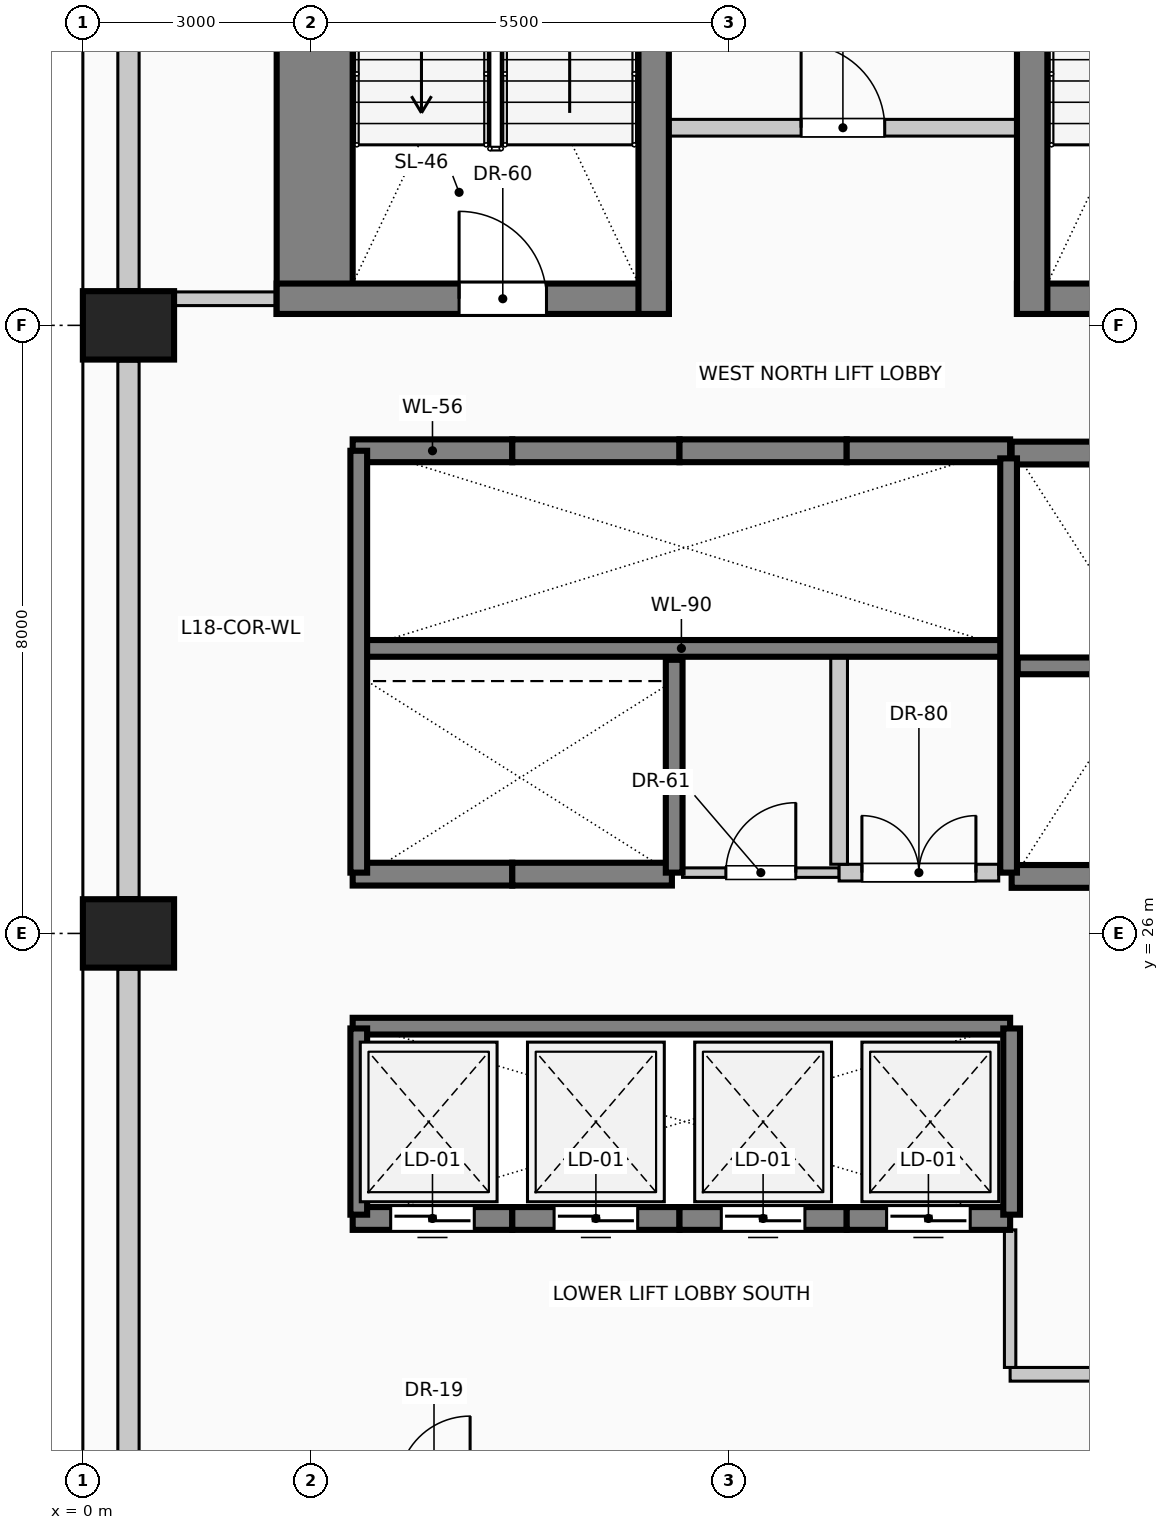
"""IFC4 building model, lengths in metres.
Left out: names, types, materials, properties, quantities, classifications, styles, units other than length and angle.
Written with IfcOpenShell. Run it as: python <this file> out.ifc"""

import sys

from ifc_helpers import new_model, si_unit, direction, frame, frame_2d, origin, origin_2d, place, context, subcontext, project, spatial, rectangle, extrude, element, fill, save


model = new_model("IFC4")
c1 = context("Model", 3, precision=1e-05, world=origin(), true_north=direction((0.0, 1.0)))
c2 = subcontext(c1, "Body", "Model", "MODEL_VIEW")
j1 = project(units=[si_unit("LENGTHUNIT", "METRE"), si_unit("PLANEANGLEUNIT", "RADIAN")], contexts=[c1])
p1 = place(None, origin())
s1 = spatial("IfcSite", under=j1, at=p1, CompositionType="ELEMENT")
p2 = place(p1, origin())
s2 = spatial("IfcBuilding", under=s1, at=p2, CompositionType="ELEMENT")
p3 = place(p2, frame((0.0, 0.0, 74.6)))
s3 = spatial("IfcBuildingStorey", under=s2, at=p3, CompositionType="ELEMENT", Elevation=74.6)
p4 = place(p3, frame((3.05, 34.15, 0.0), z_axis=(0.0, 0.0, 1.0), x_axis=(0.0, 1.0, 0.0)))
e1 = element("IfcWall", 1, at=p4, inside=s3, PredefinedType="SHEAR", context=c2, shape_type="SweptSolid", body=[
    extrude(rectangle(XDim=9.28, YDim=1.0, at=frame_2d((4.64, 0.0))), origin(), (0.0, 0.0, 1.0), 4.0),
])
p5 = place(p3, frame((2.55, 34.35, 0.0), z_axis=(0.0, 0.0, 1.0), x_axis=(1.0, 0.0, 0.0)))
e2 = element("IfcWall", 2, at=p5, inside=s3, PredefinedType="SHEAR", context=c2, shape_type="SweptSolid", body=[
    extrude(rectangle(XDim=5.16, YDim=0.4, at=frame_2d((2.58, 0.0))), origin(), (0.0, 0.0, 1.0), 4.0),
])
p6 = place(p5, frame((2.4, 0.0, 0.0)))
e3 = element("IfcOpeningElement", 3, at=p6, cuts=e2, PredefinedType="OPENING", context=c2, shape_type="SweptSolid", body=[
    extrude(rectangle(XDim=1.15, YDim=2.2, at=frame_2d((0.575, 1.1))), frame((0.0, 0.21, 0.0), z_axis=(0.0, -1.0, 0.0), x_axis=(1.0, 0.0, 0.0)), (0.0, 0.0, 1.0), 0.42),
])
p7 = place(p3, frame((12.29, 34.35, 0.0), z_axis=(0.0, 0.0, 1.0), x_axis=(1.0, 0.0, 0.0)))
e4 = element("IfcWall", 4, at=p7, inside=s3, PredefinedType="SHEAR", context=c2, shape_type="SweptSolid", body=[
    extrude(rectangle(XDim=5.16, YDim=0.4, at=frame_2d((2.58, 0.0))), origin(), (0.0, 0.0, 1.0), 4.0),
])
p8 = place(p7, frame((1.4, 0.0, 0.0)))
e5 = element("IfcOpeningElement", 5, at=p8, cuts=e4, PredefinedType="OPENING", context=c2, shape_type="SweptSolid", body=[
    extrude(rectangle(XDim=1.15, YDim=2.2, at=frame_2d((0.575, 1.1))), frame((0.0, 0.21, 0.0), z_axis=(0.0, -1.0, 0.0), x_axis=(1.0, 0.0, 0.0)), (0.0, 0.0, 1.0), 0.42),
])
for number, where, z_axis, x_axis in (
    (6, (7.51, 34.15, 0.0), (0.0, 0.0, 1.0), (0.0, 1.0, 0.0)),
    (7, (12.49, 34.15, 0.0), (0.0, 0.0, 1.0), (0.0, 1.0, 0.0)),
):
    element("IfcWall", number, at=place(p3, frame(where, z_axis=z_axis, x_axis=x_axis)), inside=s3, PredefinedType="SHEAR", context=c2, shape_type="SweptSolid", body=[
        extrude(rectangle(XDim=9.28, YDim=0.4, at=frame_2d((4.64, 0.0))), origin(), (0.0, 0.0, 1.0), 4.0),
    ])
for number, where, z_axis, x_axis in (
    (8, (0.6, 26.0, 0.0), (0.0, 0.0, 1.0), (0.0, 1.0, 0.0)),
    (9, (0.6, 34.0, 0.0), (0.0, 0.0, 1.0), (0.0, 1.0, 0.0)),
):
    element("IfcColumn", number, at=place(p3, frame(where, z_axis=z_axis, x_axis=x_axis)), inside=s3, PredefinedType="COLUMN", context=c2, shape_type="SweptSolid", body=[
        extrude(rectangle(XDim=0.9, YDim=1.2, at=origin_2d()), origin(), (0.0, 0.0, 1.0), 4.0),
    ])
for number, where, z_axis, x_axis in (
    (10, (0.6, 18.47, 0.0), (0.0, 0.0, 1.0), (0.0, 1.0, 0.0)),
    (11, (0.6, 26.47, 0.0), (0.0, 0.0, 1.0), (0.0, 1.0, 0.0)),
):
    element("IfcWall", number, at=place(p3, frame(where, z_axis=z_axis, x_axis=x_axis)), inside=s3, PredefinedType="SOLIDWALL", context=c2, shape_type="SweptSolid", body=[
        extrude(rectangle(XDim=7.06, YDim=0.28, at=frame_2d((3.53, 0.0))), origin(), (0.0, 0.0, 1.0), 2.85),
    ])
p9 = place(p3, frame((0.6, 34.47, 0.0), z_axis=(0.0, 0.0, 1.0), x_axis=(0.0, 1.0, 0.0)))
e12 = element("IfcWall", 12, at=p9, inside=s3, PredefinedType="SOLIDWALL", context=c2, shape_type="SweptSolid", body=[
    extrude(rectangle(XDim=7.46, YDim=0.28, at=frame_2d((3.73, 0.0))), origin(), (0.0, 0.0, 1.0), 2.85),
])
p10 = place(p3, frame((5.65, 22.25, 0.0), z_axis=(0.0, 0.0, 1.0), x_axis=(-1.0, 0.0, 0.0)))
e13 = element("IfcWall", 13, at=p10, inside=s3, PredefinedType="SOLIDWALL", context=c2, shape_type="SweptSolid", body=[
    extrude(rectangle(XDim=2.1, YDim=0.3, at=frame_2d((1.05, 0.0))), origin(), (0.0, 0.0, 1.0), 4.0),
])
p11 = place(p10, frame((0.5, 0.0, 0.0)))
e14 = element("IfcOpeningElement", 14, at=p11, cuts=e13, PredefinedType="OPENING", context=c2, shape_type="SweptSolid", body=[
    extrude(rectangle(XDim=1.1, YDim=2.2, at=frame_2d((0.55, 1.1))), frame((0.0, 0.16, 0.0), z_axis=(0.0, -1.0, 0.0), x_axis=(1.0, 0.0, 0.0)), (0.0, 0.0, 1.0), 0.32),
])
p12 = place(p3, frame((7.85, 22.25, 0.0), z_axis=(0.0, 0.0, 1.0), x_axis=(-1.0, 0.0, 0.0)))
e15 = element("IfcWall", 15, at=p12, inside=s3, PredefinedType="SOLIDWALL", context=c2, shape_type="SweptSolid", body=[
    extrude(rectangle(XDim=2.2, YDim=0.3, at=frame_2d((1.1, 0.0))), origin(), (0.0, 0.0, 1.0), 4.0),
])
p13 = place(p12, frame((0.55, 0.0, 0.0)))
e16 = element("IfcOpeningElement", 16, at=p13, cuts=e15, PredefinedType="OPENING", context=c2, shape_type="SweptSolid", body=[
    extrude(rectangle(XDim=1.1, YDim=2.2, at=frame_2d((0.55, 1.1))), frame((0.0, 0.16, 0.0), z_axis=(0.0, -1.0, 0.0), x_axis=(1.0, 0.0, 0.0)), (0.0, 0.0, 1.0), 0.32),
])
p14 = place(p3, frame((10.05, 22.25, 0.0), z_axis=(0.0, 0.0, 1.0), x_axis=(-1.0, 0.0, 0.0)))
e17 = element("IfcWall", 17, at=p14, inside=s3, PredefinedType="SOLIDWALL", context=c2, shape_type="SweptSolid", body=[
    extrude(rectangle(XDim=2.2, YDim=0.3, at=frame_2d((1.1, 0.0))), origin(), (0.0, 0.0, 1.0), 4.0),
])
p15 = place(p14, frame((0.55, 0.0, 0.0)))
e18 = element("IfcOpeningElement", 18, at=p15, cuts=e17, PredefinedType="OPENING", context=c2, shape_type="SweptSolid", body=[
    extrude(rectangle(XDim=1.1, YDim=2.2, at=frame_2d((0.55, 1.1))), frame((0.0, 0.16, 0.0), z_axis=(0.0, -1.0, 0.0), x_axis=(1.0, 0.0, 0.0)), (0.0, 0.0, 1.0), 0.32),
])
p16 = place(p3, frame((12.2, 22.25, 0.0), z_axis=(0.0, 0.0, 1.0), x_axis=(-1.0, 0.0, 0.0)))
e19 = element("IfcWall", 19, at=p16, inside=s3, PredefinedType="SOLIDWALL", context=c2, shape_type="SweptSolid", body=[
    extrude(rectangle(XDim=2.15, YDim=0.3, at=frame_2d((1.075, 0.0))), origin(), (0.0, 0.0, 1.0), 4.0),
])
p17 = place(p16, frame((0.525, 0.0, 0.0)))
e20 = element("IfcOpeningElement", 20, at=p17, cuts=e19, PredefinedType="OPENING", context=c2, shape_type="SweptSolid", body=[
    extrude(rectangle(XDim=1.1, YDim=2.2, at=frame_2d((0.55, 1.1))), frame((0.0, 0.16, 0.0), z_axis=(0.0, -1.0, 0.0), x_axis=(1.0, 0.0, 0.0)), (0.0, 0.0, 1.0), 0.32),
])
for number, where, z_axis, x_axis in (
    (21, (14.0, 26.75, 0.0), (0.0, 0.0, 1.0), (-1.0, 0.0, 0.0)),
    (22, (12.22, 32.32, 0.0), (0.0, 0.0, 1.0), (1.0, 0.0, 0.0)),
):
    element("IfcWall", number, at=place(p3, frame(where, z_axis=z_axis, x_axis=x_axis)), inside=s3, PredefinedType="SOLIDWALL", context=c2, shape_type="SweptSolid", body=[
        extrude(rectangle(XDim=1.78, YDim=0.3, at=frame_2d((0.89, 0.0))), origin(), (0.0, 0.0, 1.0), 4.0),
    ])
p18 = place(p3, frame((3.55, 32.35, 0.0), z_axis=(0.0, 0.0, 1.0), x_axis=(1.0, 0.0, 0.0)))
e23 = element("IfcWall", 23, at=p18, inside=s3, PredefinedType="SOLIDWALL", context=c2, shape_type="SweptSolid", body=[
    extrude(rectangle(XDim=2.1, YDim=0.3, at=frame_2d((1.05, 0.0))), origin(), (0.0, 0.0, 1.0), 4.0),
])
p19 = place(p3, frame((5.65, 32.35, 0.0), z_axis=(0.0, 0.0, 1.0), x_axis=(1.0, 0.0, 0.0)))
e24 = element("IfcWall", 24, at=p19, inside=s3, PredefinedType="SOLIDWALL", context=c2, shape_type="SweptSolid", body=[
    extrude(rectangle(XDim=2.2, YDim=0.3, at=frame_2d((1.1, 0.0))), origin(), (0.0, 0.0, 1.0), 4.0),
])
p20 = place(p3, frame((7.85, 32.35, 0.0), z_axis=(0.0, 0.0, 1.0), x_axis=(1.0, 0.0, 0.0)))
e25 = element("IfcWall", 25, at=p20, inside=s3, PredefinedType="SOLIDWALL", context=c2, shape_type="SweptSolid", body=[
    extrude(rectangle(XDim=2.2, YDim=0.3, at=frame_2d((1.1, 0.0))), origin(), (0.0, 0.0, 1.0), 4.0),
])
p21 = place(p3, frame((10.05, 32.35, 0.0), z_axis=(0.0, 0.0, 1.0), x_axis=(1.0, 0.0, 0.0)))
e26 = element("IfcWall", 26, at=p21, inside=s3, PredefinedType="SOLIDWALL", context=c2, shape_type="SweptSolid", body=[
    extrude(rectangle(XDim=2.15, YDim=0.3, at=frame_2d((1.075, 0.0))), origin(), (0.0, 0.0, 1.0), 4.0),
])
p22 = place(p3, frame((5.65, 26.78, 0.0), z_axis=(0.0, 0.0, 1.0), x_axis=(-1.0, 0.0, 0.0)))
e27 = element("IfcWall", 27, at=p22, inside=s3, PredefinedType="SOLIDWALL", context=c2, shape_type="SweptSolid", body=[
    extrude(rectangle(XDim=2.1, YDim=0.3, at=frame_2d((1.05, 0.0))), origin(), (0.0, 0.0, 1.0), 4.0),
])
p23 = place(p3, frame((7.75, 26.78, 0.0), z_axis=(0.0, 0.0, 1.0), x_axis=(-1.0, 0.0, 0.0)))
e28 = element("IfcWall", 28, at=p23, inside=s3, PredefinedType="SOLIDWALL", context=c2, shape_type="SweptSolid", body=[
    extrude(rectangle(XDim=2.1, YDim=0.3, at=frame_2d((1.05, 0.0))), origin(), (0.0, 0.0, 1.0), 4.0),
])
p24 = place(p3, frame((3.55, 29.75, 0.0), z_axis=(0.0, 0.0, 1.0), x_axis=(1.0, 0.0, 0.0)))
e29 = element("IfcWall", 29, at=p24, inside=s3, PredefinedType="SOLIDWALL", context=c2, shape_type="SweptSolid", body=[
    extrude(rectangle(XDim=8.65, YDim=0.22, at=frame_2d((4.325, 0.0))), origin(), (0.0, 0.0, 1.0), 4.0),
])
p25 = place(p3, frame((3.63, 26.8, 0.0), z_axis=(0.0, 0.0, 1.0), x_axis=(0.0, 1.0, 0.0)))
e30 = element("IfcWall", 30, at=p25, inside=s3, PredefinedType="SOLIDWALL", context=c2, shape_type="SweptSolid", body=[
    extrude(rectangle(XDim=5.55, YDim=0.22, at=frame_2d((2.775, 0.0))), origin(), (0.0, 0.0, 1.0), 4.0),
])
p26 = place(p3, frame((7.78, 26.8, 0.0), z_axis=(0.0, 0.0, 1.0), x_axis=(0.0, 1.0, 0.0)))
e31 = element("IfcWall", 31, at=p26, inside=s3, PredefinedType="SOLIDWALL", context=c2, shape_type="SweptSolid", body=[
    extrude(rectangle(XDim=2.8, YDim=0.22, at=frame_2d((1.4, 0.0))), origin(), (0.0, 0.0, 1.0), 4.0),
])
p27 = place(p3, frame((12.18, 26.8, 0.0), z_axis=(0.0, 0.0, 1.0), x_axis=(0.0, 1.0, 0.0)))
e32 = element("IfcWall", 32, at=p27, inside=s3, PredefinedType="SOLIDWALL", context=c2, shape_type="SweptSolid", body=[
    extrude(rectangle(XDim=5.45, YDim=0.22, at=frame_2d((2.725, 0.0))), origin(), (0.0, 0.0, 1.0), 4.0),
])
p28 = place(p3, frame((12.3, 29.52, 0.0), z_axis=(0.0, 0.0, 1.0), x_axis=(1.0, 0.0, 0.0)))
e33 = element("IfcWall", 33, at=p28, inside=s3, PredefinedType="SOLIDWALL", context=c2, shape_type="SweptSolid", body=[
    extrude(rectangle(XDim=3.4, YDim=0.22, at=frame_2d((1.7, 0.0))), origin(), (0.0, 0.0, 1.0), 4.0),
])
p29 = place(p3, frame((3.55, 24.78, 0.0), z_axis=(0.0, 0.0, 1.0), x_axis=(1.0, 0.0, 0.0)))
e34 = element("IfcWall", 34, at=p29, inside=s3, PredefinedType="SOLIDWALL", context=c2, shape_type="SweptSolid", body=[
    extrude(rectangle(XDim=8.65, YDim=0.22, at=frame_2d((4.325, 0.0))), origin(), (0.0, 0.0, 1.0), 4.0),
])
for number, where, z_axis, x_axis in (
    (35, (3.63, 22.3, 0.0), (0.0, 0.0, 1.0), (0.0, 1.0, 0.0)),
    (36, (12.22, 22.3, 0.0), (0.0, 0.0, 1.0), (0.0, 1.0, 0.0)),
):
    element("IfcWall", number, at=place(p3, frame(where, z_axis=z_axis, x_axis=x_axis)), inside=s3, PredefinedType="SOLIDWALL", context=c2, shape_type="SweptSolid", body=[
        extrude(rectangle(XDim=2.45, YDim=0.22, at=frame_2d((1.225, 0.0))), origin(), (0.0, 0.0, 1.0), 4.0),
    ])
p30 = place(p3, frame((7.51, 36.6, 0.0), z_axis=(0.0, 0.0, 1.0), x_axis=(1.0, 0.0, 0.0)))
e37 = element("IfcWall", 37, at=p30, inside=s3, PredefinedType="PARTITIONING", context=c2, shape_type="SweptSolid", body=[
    extrude(rectangle(XDim=4.98, YDim=0.22, at=frame_2d((2.49, 0.0))), origin(), (0.0, 0.0, 1.0), 3.7),
])
p31 = place(p30, frame((1.94, 0.0, 0.0)))
e38 = element("IfcOpeningElement", 38, at=p31, cuts=e37, PredefinedType="OPENING", context=c2, shape_type="SweptSolid", body=[
    extrude(rectangle(XDim=1.1, YDim=2.2, at=frame_2d((0.55, 1.1))), frame((0.0, 0.12, 0.0), z_axis=(0.0, -1.0, 0.0), x_axis=(1.0, 0.0, 0.0)), (0.0, 0.0, 1.0), 0.24),
])
p32 = place(p3, frame((12.2, 20.2, 0.0), z_axis=(0.0, 0.0, 1.0), x_axis=(1.0, 0.0, 0.0)))
e39 = element("IfcWall", 39, at=p32, inside=s3, PredefinedType="PARTITIONING", context=c2, shape_type="SweptSolid", body=[
    extrude(rectangle(XDim=4.45, YDim=0.18, at=frame_2d((2.225, 0.0))), origin(), (0.0, 0.0, 1.0), 3.7),
])
p33 = place(p3, frame((7.89, 26.8, 0.0), z_axis=(0.0, 0.0, 1.0), x_axis=(1.0, 0.0, 0.0)))
e40 = element("IfcWall", 40, at=p33, inside=s3, PredefinedType="PARTITIONING", context=c2, shape_type="SweptSolid", body=[
    extrude(rectangle(XDim=2.06, YDim=0.125, at=frame_2d((1.03, 0.0))), origin(), (0.0, 0.0, 1.0), 3.7),
])
p34 = place(p33, frame((0.57, 0.0, 0.0)))
e41 = element("IfcOpeningElement", 41, at=p34, cuts=e40, PredefinedType="OPENING", context=c2, shape_type="SweptSolid", body=[
    extrude(rectangle(XDim=0.92, YDim=2.1, at=frame_2d((0.46, 1.05))), frame((0.0, 0.073, 0.0), z_axis=(0.0, -1.0, 0.0), x_axis=(1.0, 0.0, 0.0)), (0.0, 0.0, 1.0), 0.145),
])
p35 = place(p3, frame((9.95, 26.8, 0.0), z_axis=(0.0, 0.0, 1.0), x_axis=(1.0, 0.0, 0.0)))
e42 = element("IfcWall", 42, at=p35, inside=s3, PredefinedType="PARTITIONING", context=c2, shape_type="SweptSolid", body=[
    extrude(rectangle(XDim=2.1, YDim=0.22, at=frame_2d((1.05, 0.0))), origin(), (0.0, 0.0, 1.0), 3.7),
])
p36 = place(p35, frame((0.3, 0.0, 0.0)))
e43 = element("IfcOpeningElement", 43, at=p36, cuts=e42, PredefinedType="OPENING", context=c2, shape_type="SweptSolid", body=[
    extrude(rectangle(XDim=1.5, YDim=2.25, at=frame_2d((0.75, 1.125))), frame((0.0, 0.12, 0.0), z_axis=(0.0, -1.0, 0.0), x_axis=(1.0, 0.0, 0.0)), (0.0, 0.0, 1.0), 0.24),
])
p37 = place(p3, frame((1.2, 34.35, 0.0), z_axis=(0.0, 0.0, 1.0), x_axis=(1.0, 0.0, 0.0)))
e44 = element("IfcWall", 44, at=p37, inside=s3, PredefinedType="PARTITIONING", context=c2, shape_type="SweptSolid", body=[
    extrude(rectangle(XDim=1.35, YDim=0.18, at=frame_2d((0.675, 0.0))), origin(), (0.0, 0.0, 1.0), 3.7),
])
p38 = place(p3, frame((9.95, 26.91, 0.0), z_axis=(0.0, 0.0, 1.0), x_axis=(0.0, 1.0, 0.0)))
e45 = element("IfcWall", 45, at=p38, inside=s3, PredefinedType="PARTITIONING", context=c2, shape_type="SweptSolid", body=[
    extrude(rectangle(XDim=2.73, YDim=0.22, at=frame_2d((1.365, 0.0))), origin(), (0.0, 0.0, 1.0), 3.7),
])
p39 = place(p3, frame((12.2, 20.29, 0.0), z_axis=(0.0, 0.0, 1.0), x_axis=(0.0, 1.0, 0.0)))
e46 = element("IfcWall", 46, at=p39, inside=s3, PredefinedType="PARTITIONING", context=c2, shape_type="SweptSolid", body=[
    extrude(rectangle(XDim=1.81, YDim=0.15, at=frame_2d((0.905, 0.0))), origin(), (0.0, 0.0, 1.0), 3.7),
])
p40 = place(p11, origin())
e47 = element("IfcDoor", 47, at=p40, inside=s3, OperationType="SLIDING_TO_LEFT", PredefinedType="DOOR", context=c2, shape_type="SweptSolid", body=[
    extrude(rectangle(XDim=1.1, YDim=2.2, at=frame_2d((0.55, 1.1))), frame((0.0, 0.025, 0.0), z_axis=(0.0, -1.0, 0.0), x_axis=(1.0, 0.0, 0.0)), (0.0, 0.0, 1.0), 0.05),
])
fill(e14, e47)
p41 = place(p13, origin())
e48 = element("IfcDoor", 48, at=p41, inside=s3, OperationType="SLIDING_TO_RIGHT", PredefinedType="DOOR", context=c2, shape_type="SweptSolid", body=[
    extrude(rectangle(XDim=1.1, YDim=2.2, at=frame_2d((0.55, 1.1))), frame((0.0, 0.025, 0.0), z_axis=(0.0, -1.0, 0.0), x_axis=(1.0, 0.0, 0.0)), (0.0, 0.0, 1.0), 0.05),
])
fill(e16, e48)
p42 = place(p15, origin())
e49 = element("IfcDoor", 49, at=p42, inside=s3, OperationType="SLIDING_TO_LEFT", PredefinedType="DOOR", context=c2, shape_type="SweptSolid", body=[
    extrude(rectangle(XDim=1.1, YDim=2.2, at=frame_2d((0.55, 1.1))), frame((0.0, 0.025, 0.0), z_axis=(0.0, -1.0, 0.0), x_axis=(1.0, 0.0, 0.0)), (0.0, 0.0, 1.0), 0.05),
])
fill(e18, e49)
p43 = place(p17, origin())
e50 = element("IfcDoor", 50, at=p43, inside=s3, OperationType="SLIDING_TO_RIGHT", PredefinedType="DOOR", context=c2, shape_type="SweptSolid", body=[
    extrude(rectangle(XDim=1.1, YDim=2.2, at=frame_2d((0.55, 1.1))), frame((0.0, 0.025, 0.0), z_axis=(0.0, -1.0, 0.0), x_axis=(1.0, 0.0, 0.0)), (0.0, 0.0, 1.0), 0.05),
])
fill(e20, e50)
p44 = place(p6, origin())
e51 = element("IfcDoor", 51, at=p44, inside=s3, OperationType="SINGLE_SWING_LEFT", PredefinedType="DOOR", context=c2, shape_type="SweptSolid", body=[
    extrude(rectangle(XDim=1.15, YDim=2.2, at=frame_2d((0.575, 1.1))), frame((0.0, 0.025, 0.0), z_axis=(0.0, -1.0, 0.0), x_axis=(1.0, 0.0, 0.0)), (0.0, 0.0, 1.0), 0.05),
])
fill(e3, e51)
p45 = place(p31, origin())
e52 = element("IfcDoor", 52, at=p45, inside=s3, OperationType="SINGLE_SWING_LEFT", PredefinedType="DOOR", context=c2, shape_type="SweptSolid", body=[
    extrude(rectangle(XDim=1.1, YDim=2.2, at=frame_2d((0.55, 1.1))), frame((0.0, 0.025, 0.0), z_axis=(0.0, -1.0, 0.0), x_axis=(1.0, 0.0, 0.0)), (0.0, 0.0, 1.0), 0.05),
])
fill(e38, e52)
p46 = place(p34, origin())
e53 = element("IfcDoor", 53, at=p46, inside=s3, OperationType="SINGLE_SWING_RIGHT", PredefinedType="DOOR", context=c2, shape_type="SweptSolid", body=[
    extrude(rectangle(XDim=0.92, YDim=2.1, at=frame_2d((0.46, 1.05))), frame((0.0, 0.025, 0.0), z_axis=(0.0, -1.0, 0.0), x_axis=(1.0, 0.0, 0.0)), (0.0, 0.0, 1.0), 0.05),
])
fill(e41, e53)
p47 = place(p36, origin())
e54 = element("IfcDoor", 54, at=p47, inside=s3, OperationType="DOUBLE_DOOR_SINGLE_SWING", PredefinedType="DOOR", context=c2, shape_type="SweptSolid", body=[
    extrude(rectangle(XDim=1.5, YDim=2.25, at=frame_2d((0.75, 1.125))), frame((0.0, 0.025, 0.0), z_axis=(0.0, -1.0, 0.0), x_axis=(1.0, 0.0, 0.0)), (0.0, 0.0, 1.0), 0.05),
])
fill(e43, e54)
save(model, sys.argv[1])
